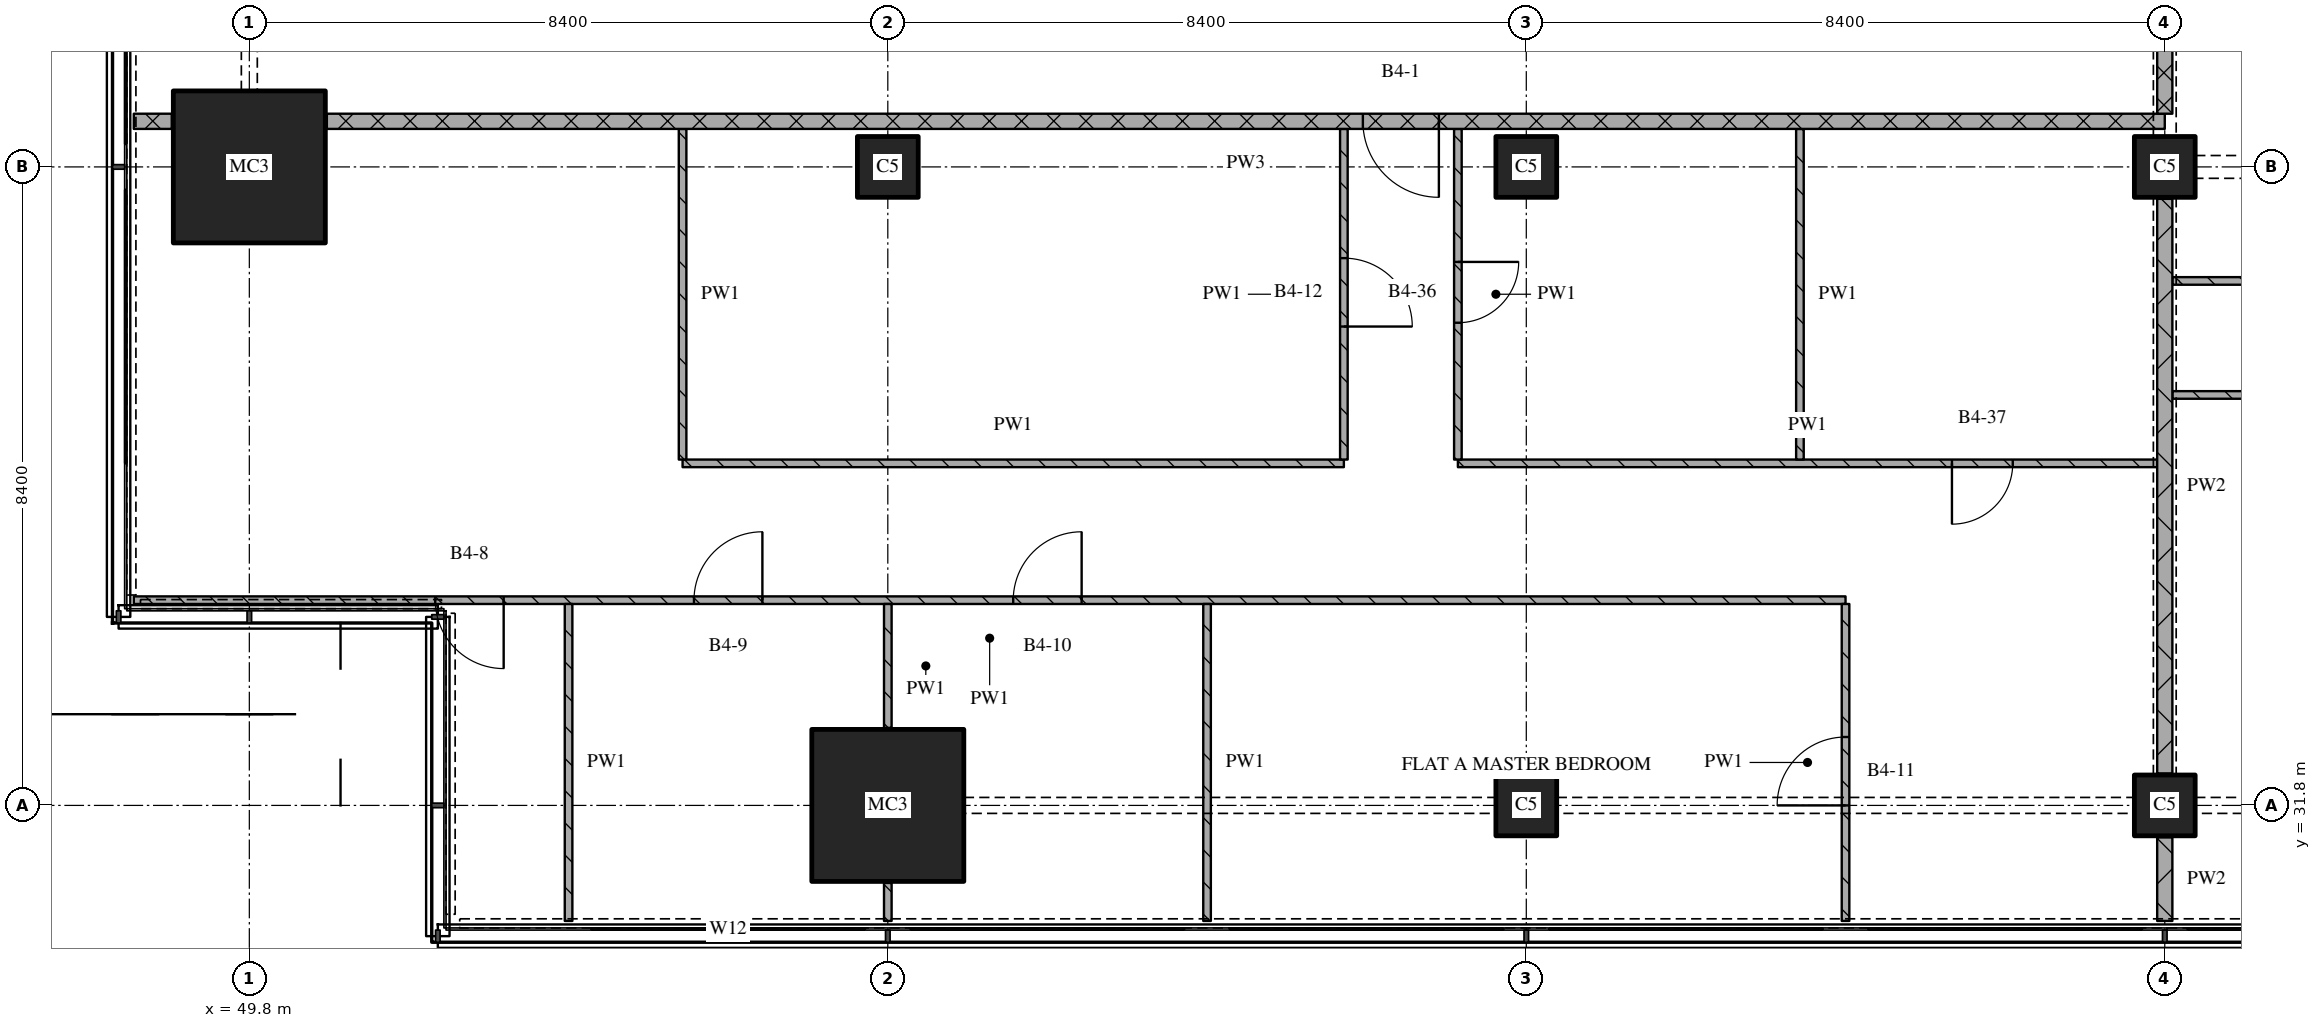
"""IFC4 building model, lengths in metres.
Left out: names, types, materials, properties, quantities, classifications, styles, units other than length and angle.
Written with IfcOpenShell. Run it as: python <this file> out.ifc"""

import sys

from ifc_helpers import new_model, si_unit, direction, frame, frame_2d, origin, origin_2d, place, context, subcontext, project, spatial, rectangle, extrude, element, fill, save


model = new_model("IFC4")
c1 = context("Model", 3, precision=1e-05, world=origin(), true_north=direction((0.0, 1.0)))
c2 = subcontext(c1, "Body", "Model", "MODEL_VIEW")
j1 = project(units=[si_unit("LENGTHUNIT", "METRE"), si_unit("PLANEANGLEUNIT", "RADIAN")], contexts=[c1])
p1 = place(None, origin())
s1 = spatial("IfcSite", under=j1, at=p1, CompositionType="ELEMENT")
p2 = place(p1, origin())
s2 = spatial("IfcBuilding", under=s1, at=p2, CompositionType="ELEMENT")
p3 = place(p2, frame((0.0, 0.0, 134.85)))
s3 = spatial("IfcBuildingStorey", under=s2, at=p3, CompositionType="ELEMENT", Elevation=134.85)
for number, where, z_axis, x_axis in (
    (1, (49.8, 40.2, 0.0), (0.0, 0.0, 1.0), (1.0, 0.0, 0.0)),
    (2, (58.2, 31.8, 0.0), (0.0, 0.0, 1.0), (1.0, 0.0, 0.0)),
):
    element("IfcColumn", number, at=place(p3, frame(where, z_axis=z_axis, x_axis=x_axis)), inside=s3, PredefinedType="COLUMN", context=c2, shape_type="SweptSolid", body=[
        extrude(rectangle(XDim=2.0, YDim=2.0, at=origin_2d()), origin(), (0.0, 0.0, 1.0), 3.6),
    ])
for number, where, z_axis, x_axis in (
    (3, (58.2, 40.2, 0.0), (0.0, 0.0, 1.0), (1.0, 0.0, 0.0)),
    (4, (66.6, 31.8, 0.0), (0.0, 0.0, 1.0), (1.0, 0.0, 0.0)),
    (5, (66.6, 40.2, 0.0), (0.0, 0.0, 1.0), (1.0, 0.0, 0.0)),
    (6, (75.0, 31.8, 0.0), (0.0, 0.0, 1.0), (1.0, 0.0, 0.0)),
    (7, (75.0, 40.2, 0.0), (0.0, 0.0, 1.0), (1.0, 0.0, 0.0)),
):
    element("IfcColumn", number, at=place(p3, frame(where, z_axis=z_axis, x_axis=x_axis)), inside=s3, PredefinedType="COLUMN", context=c2, shape_type="SweptSolid", body=[
        extrude(rectangle(XDim=0.8, YDim=0.8, at=origin_2d()), origin(), (0.0, 0.0, 1.0), 3.6),
    ])
p4 = place(p3, frame((70.8, 34.5, 0.0), z_axis=(0.0, 0.0, 1.0), x_axis=(-1.0, 0.0, 0.0)))
e8 = element("IfcWall", 8, at=p4, inside=s3, PredefinedType="PARTITIONING", context=c2, shape_type="SweptSolid", body=[
    extrude(rectangle(XDim=22.52, YDim=0.1, at=frame_2d((11.26, 0.0))), origin(), (0.0, 0.0, 1.0), 3.32),
])
p5 = place(p4, frame((10.05, 0.0, 0.0)))
e9 = element("IfcOpeningElement", 9, at=p5, cuts=e8, PredefinedType="OPENING", context=c2, shape_type="SweptSolid", body=[
    extrude(rectangle(XDim=0.9, YDim=2.1, at=frame_2d((0.45, 1.05))), frame((0.0, 0.06, 0.0), z_axis=(0.0, -1.0, 0.0), x_axis=(1.0, 0.0, 0.0)), (0.0, 0.0, 1.0), 0.12),
])
p6 = place(p4, frame((14.25, 0.0, 0.0)))
e10 = element("IfcOpeningElement", 10, at=p6, cuts=e8, PredefinedType="OPENING", context=c2, shape_type="SweptSolid", body=[
    extrude(rectangle(XDim=0.9, YDim=2.1, at=frame_2d((0.45, 1.05))), frame((0.0, 0.06, 0.0), z_axis=(0.0, -1.0, 0.0), x_axis=(1.0, 0.0, 0.0)), (0.0, 0.0, 1.0), 0.12),
])
p7 = place(p4, frame((17.654, 0.0, 0.0)))
e11 = element("IfcOpeningElement", 11, at=p7, cuts=e8, PredefinedType="OPENING", context=c2, shape_type="SweptSolid", body=[
    extrude(rectangle(XDim=0.9, YDim=2.1, at=frame_2d((0.45, 1.05))), frame((0.0, 0.06, 0.0), z_axis=(0.0, -1.0, 0.0), x_axis=(1.0, 0.0, 0.0)), (0.0, 0.0, 1.0), 0.12),
])
p8 = place(p3, frame((55.5, 36.3, 0.0), z_axis=(0.0, 0.0, 1.0), x_axis=(1.0, 0.0, 0.0)))
e12 = element("IfcWall", 12, at=p8, inside=s3, PredefinedType="PARTITIONING", context=c2, shape_type="SweptSolid", body=[
    extrude(rectangle(XDim=8.7, YDim=0.1, at=frame_2d((4.35, 0.0))), origin(), (0.0, 0.0, 1.0), 3.32),
])
p9 = place(p3, frame((65.7, 36.3, 0.0), z_axis=(0.0, 0.0, 1.0), x_axis=(1.0, 0.0, 0.0)))
e13 = element("IfcWall", 13, at=p9, inside=s3, PredefinedType="PARTITIONING", context=c2, shape_type="SweptSolid", body=[
    extrude(rectangle(XDim=9.2, YDim=0.1, at=frame_2d((4.6, 0.0))), origin(), (0.0, 0.0, 1.0), 3.32),
])
p10 = place(p9, frame((6.5, 0.0, 0.0)))
e14 = element("IfcOpeningElement", 14, at=p10, cuts=e13, PredefinedType="OPENING", context=c2, shape_type="SweptSolid", body=[
    extrude(rectangle(XDim=0.8, YDim=2.1, at=frame_2d((0.4, 1.05))), frame((0.0, 0.06, 0.0), z_axis=(0.0, -1.0, 0.0), x_axis=(1.0, 0.0, 0.0)), (0.0, 0.0, 1.0), 0.12),
])
p11 = place(p3, frame((96.0, 37.2, 0.0), z_axis=(0.0, 0.0, 1.0), x_axis=(-1.0, 0.0, 0.0)))
e15 = element("IfcWall", 15, at=p11, inside=s3, PredefinedType="PARTITIONING", context=c2, shape_type="SweptSolid", body=[
    extrude(rectangle(XDim=20.9, YDim=0.1, at=frame_2d((10.45, 0.0))), origin(), (0.0, 0.0, 1.0), 3.32),
])
p12 = place(p11, frame((10.05, 0.0, 0.0)))
e16 = element("IfcOpeningElement", 16, at=p12, cuts=e15, PredefinedType="OPENING", context=c2, shape_type="SweptSolid", body=[
    extrude(rectangle(XDim=0.9, YDim=2.1, at=frame_2d((0.45, 1.05))), frame((0.0, 0.06, 0.0), z_axis=(0.0, -1.0, 0.0), x_axis=(1.0, 0.0, 0.0)), (0.0, 0.0, 1.0), 0.12),
])
p13 = place(p11, frame((14.25, 0.0, 0.0)))
e17 = element("IfcOpeningElement", 17, at=p13, cuts=e15, PredefinedType="OPENING", context=c2, shape_type="SweptSolid", body=[
    extrude(rectangle(XDim=0.9, YDim=2.1, at=frame_2d((0.45, 1.05))), frame((0.0, 0.06, 0.0), z_axis=(0.0, -1.0, 0.0), x_axis=(1.0, 0.0, 0.0)), (0.0, 0.0, 1.0), 0.12),
])
p14 = place(p11, frame((18.45, 0.0, 0.0)))
e18 = element("IfcOpeningElement", 18, at=p14, cuts=e15, PredefinedType="OPENING", context=c2, shape_type="SweptSolid", body=[
    extrude(rectangle(XDim=0.9, YDim=2.1, at=frame_2d((0.45, 1.05))), frame((0.0, 0.06, 0.0), z_axis=(0.0, -1.0, 0.0), x_axis=(1.0, 0.0, 0.0)), (0.0, 0.0, 1.0), 0.12),
])
p15 = place(p3, frame((75.1, 38.7, 0.0), z_axis=(0.0, 0.0, 1.0), x_axis=(1.0, 0.0, 0.0)))
e19 = element("IfcWall", 19, at=p15, inside=s3, PredefinedType="PARTITIONING", context=c2, shape_type="SweptSolid", body=[
    extrude(rectangle(XDim=7.1, YDim=0.1, at=frame_2d((3.55, 0.0))), origin(), (0.0, 0.0, 1.0), 3.32),
])
p16 = place(p15, frame((1.75, 0.0, 0.0)))
e20 = element("IfcOpeningElement", 20, at=p16, cuts=e19, PredefinedType="OPENING", context=c2, shape_type="SweptSolid", body=[
    extrude(rectangle(XDim=0.8, YDim=2.1, at=frame_2d((0.4, 1.05))), frame((0.0, 0.06, 0.0), z_axis=(0.0, -1.0, 0.0), x_axis=(1.0, 0.0, 0.0)), (0.0, 0.0, 1.0), 0.12),
])
p17 = place(p3, frame((48.28, 40.8, 0.0), z_axis=(0.0, 0.0, 1.0), x_axis=(1.0, 0.0, 0.0)))
e21 = element("IfcWall", 21, at=p17, inside=s3, PredefinedType="PARTITIONING", context=c2, shape_type="SweptSolid", body=[
    extrude(rectangle(XDim=0.5, YDim=0.2, at=frame_2d((0.25, 0.0))), origin(), (0.0, 0.0, 1.0), 3.32),
])
p18 = place(p3, frame((75.0, 40.8, 0.0), z_axis=(0.0, 0.0, 1.0), x_axis=(-1.0, 0.0, 0.0)))
e22 = element("IfcWall", 22, at=p18, inside=s3, PredefinedType="PARTITIONING", context=c2, shape_type="SweptSolid", body=[
    extrude(rectangle(XDim=24.18, YDim=0.2, at=frame_2d((12.09, 0.0))), origin(), (0.0, 0.0, 1.0), 3.32),
])
p19 = place(p18, frame((9.55, 0.0, 0.0)))
e23 = element("IfcOpeningElement", 23, at=p19, cuts=e22, PredefinedType="OPENING", context=c2, shape_type="SweptSolid", body=[
    extrude(rectangle(XDim=1.0, YDim=2.1, at=frame_2d((0.5, 1.05))), frame((0.0, 0.11, 0.0), z_axis=(0.0, -1.0, 0.0), x_axis=(1.0, 0.0, 0.0)), (0.0, 0.0, 1.0), 0.22),
])
p20 = place(p3, frame((54.0, 34.45, 0.0), z_axis=(0.0, 0.0, 1.0), x_axis=(0.0, -1.0, 0.0)))
e24 = element("IfcWall", 24, at=p20, inside=s3, PredefinedType="PARTITIONING", context=c2, shape_type="SweptSolid", body=[
    extrude(rectangle(XDim=4.17, YDim=0.1, at=frame_2d((2.085, 0.0))), origin(), (0.0, 0.0, 1.0), 3.32),
])
p21 = place(p3, frame((55.5, 40.7, 0.0), z_axis=(0.0, 0.0, 1.0), x_axis=(0.0, -1.0, 0.0)))
e25 = element("IfcWall", 25, at=p21, inside=s3, PredefinedType="PARTITIONING", context=c2, shape_type="SweptSolid", body=[
    extrude(rectangle(XDim=4.35, YDim=0.1, at=frame_2d((2.175, 0.0))), origin(), (0.0, 0.0, 1.0), 3.32),
])
p22 = place(p3, frame((58.2, 30.78, 0.0), z_axis=(0.0, 0.0, 1.0), x_axis=(0.0, -1.0, 0.0)))
e26 = element("IfcWall", 26, at=p22, inside=s3, PredefinedType="PARTITIONING", context=c2, shape_type="SweptSolid", body=[
    extrude(rectangle(XDim=0.5, YDim=0.1, at=frame_2d((0.25, 0.0))), origin(), (0.0, 0.0, 1.0), 3.32),
])
p23 = place(p3, frame((58.2, 34.45, 0.0), z_axis=(0.0, 0.0, 1.0), x_axis=(0.0, -1.0, 0.0)))
e27 = element("IfcWall", 27, at=p23, inside=s3, PredefinedType="PARTITIONING", context=c2, shape_type="SweptSolid", body=[
    extrude(rectangle(XDim=1.63, YDim=0.1, at=frame_2d((0.815, 0.0))), origin(), (0.0, 0.0, 1.0), 3.32),
])
p24 = place(p3, frame((62.4, 34.45, 0.0), z_axis=(0.0, 0.0, 1.0), x_axis=(0.0, -1.0, 0.0)))
e28 = element("IfcWall", 28, at=p24, inside=s3, PredefinedType="PARTITIONING", context=c2, shape_type="SweptSolid", body=[
    extrude(rectangle(XDim=4.17, YDim=0.1, at=frame_2d((2.085, 0.0))), origin(), (0.0, 0.0, 1.0), 3.32),
])
p25 = place(p3, frame((64.2, 36.35, 0.0), z_axis=(0.0, 0.0, 1.0), x_axis=(0.0, 1.0, 0.0)))
e29 = element("IfcWall", 29, at=p25, inside=s3, PredefinedType="PARTITIONING", context=c2, shape_type="SweptSolid", body=[
    extrude(rectangle(XDim=4.35, YDim=0.1, at=frame_2d((2.175, 0.0))), origin(), (0.0, 0.0, 1.0), 3.32),
])
p26 = place(p25, frame((1.75, 0.0, 0.0)))
e30 = element("IfcOpeningElement", 30, at=p26, cuts=e29, PredefinedType="OPENING", context=c2, shape_type="SweptSolid", body=[
    extrude(rectangle(XDim=0.9, YDim=2.1, at=frame_2d((0.45, 1.05))), frame((0.0, 0.06, 0.0), z_axis=(0.0, -1.0, 0.0), x_axis=(1.0, 0.0, 0.0)), (0.0, 0.0, 1.0), 0.12),
])
p27 = place(p3, frame((65.7, 40.7, 0.0), z_axis=(0.0, 0.0, 1.0), x_axis=(0.0, -1.0, 0.0)))
e31 = element("IfcWall", 31, at=p27, inside=s3, PredefinedType="PARTITIONING", context=c2, shape_type="SweptSolid", body=[
    extrude(rectangle(XDim=4.35, YDim=0.1, at=frame_2d((2.175, 0.0))), origin(), (0.0, 0.0, 1.0), 3.32),
])
p28 = place(p27, frame((1.75, 0.0, 0.0)))
e32 = element("IfcOpeningElement", 32, at=p28, cuts=e31, PredefinedType="OPENING", context=c2, shape_type="SweptSolid", body=[
    extrude(rectangle(XDim=0.8, YDim=2.1, at=frame_2d((0.4, 1.05))), frame((0.0, 0.06, 0.0), z_axis=(0.0, -1.0, 0.0), x_axis=(1.0, 0.0, 0.0)), (0.0, 0.0, 1.0), 0.12),
])
p29 = place(p3, frame((70.2, 40.7, 0.0), z_axis=(0.0, 0.0, 1.0), x_axis=(0.0, -1.0, 0.0)))
e33 = element("IfcWall", 33, at=p29, inside=s3, PredefinedType="PARTITIONING", context=c2, shape_type="SweptSolid", body=[
    extrude(rectangle(XDim=4.35, YDim=0.1, at=frame_2d((2.175, 0.0))), origin(), (0.0, 0.0, 1.0), 3.32),
])
p30 = place(p3, frame((70.8, 30.28, 0.0), z_axis=(0.0, 0.0, 1.0), x_axis=(0.0, 1.0, 0.0)))
e34 = element("IfcWall", 34, at=p30, inside=s3, PredefinedType="PARTITIONING", context=c2, shape_type="SweptSolid", body=[
    extrude(rectangle(XDim=4.17, YDim=0.1, at=frame_2d((2.085, 0.0))), origin(), (0.0, 0.0, 1.0), 3.32),
])
p31 = place(p30, frame((1.52, 0.0, 0.0)))
e35 = element("IfcOpeningElement", 35, at=p31, cuts=e34, PredefinedType="OPENING", context=c2, shape_type="SweptSolid", body=[
    extrude(rectangle(XDim=0.9, YDim=2.1, at=frame_2d((0.45, 1.05))), frame((0.0, 0.06, 0.0), z_axis=(0.0, -1.0, 0.0), x_axis=(1.0, 0.0, 0.0)), (0.0, 0.0, 1.0), 0.12),
])
p32 = place(p3, frame((75.0, 43.1, 0.0), z_axis=(0.0, 0.0, 1.0), x_axis=(0.0, -1.0, 0.0)))
e36 = element("IfcWall", 36, at=p32, inside=s3, PredefinedType="PARTITIONING", context=c2, shape_type="SweptSolid", body=[
    extrude(rectangle(XDim=2.2, YDim=0.2, at=frame_2d((1.1, 0.0))), origin(), (0.0, 0.0, 1.0), 2.43),
])
p33 = place(p3, frame((75.0, 31.38, 0.0), z_axis=(0.0, 0.0, 1.0), x_axis=(0.0, -1.0, 0.0)))
e37 = element("IfcWall", 37, at=p33, inside=s3, PredefinedType="PARTITIONING", context=c2, shape_type="SweptSolid", body=[
    extrude(rectangle(XDim=1.1, YDim=0.2, at=frame_2d((0.55, 0.0))), origin(), (0.0, 0.0, 1.0), 3.32),
])
p34 = place(p3, frame((75.0, 39.78, 0.0), z_axis=(0.0, 0.0, 1.0), x_axis=(0.0, -1.0, 0.0)))
e38 = element("IfcWall", 38, at=p34, inside=s3, PredefinedType="PARTITIONING", context=c2, shape_type="SweptSolid", body=[
    extrude(rectangle(XDim=7.56, YDim=0.2, at=frame_2d((3.78, 0.0))), origin(), (0.0, 0.0, 1.0), 2.83),
])
p35 = place(p5, origin())
e39 = element("IfcDoor", 39, at=p35, inside=s3, OperationType="SINGLE_SWING_RIGHT", PredefinedType="DOOR", context=c2, shape_type="SweptSolid", body=[
    extrude(rectangle(XDim=0.9, YDim=2.1, at=frame_2d((0.45, 1.05))), frame((0.0, 0.025, 0.0), z_axis=(0.0, -1.0, 0.0), x_axis=(1.0, 0.0, 0.0)), (0.0, 0.0, 1.0), 0.05),
])
fill(e9, e39)
p36 = place(p6, origin())
e40 = element("IfcDoor", 40, at=p36, inside=s3, OperationType="SINGLE_SWING_RIGHT", PredefinedType="DOOR", context=c2, shape_type="SweptSolid", body=[
    extrude(rectangle(XDim=0.9, YDim=2.1, at=frame_2d((0.45, 1.05))), frame((0.0, 0.025, 0.0), z_axis=(0.0, -1.0, 0.0), x_axis=(1.0, 0.0, 0.0)), (0.0, 0.0, 1.0), 0.05),
])
fill(e10, e40)
p37 = place(p7, origin())
e41 = element("IfcDoor", 41, at=p37, inside=s3, OperationType="SINGLE_SWING_LEFT", PredefinedType="DOOR", context=c2, shape_type="SweptSolid", body=[
    extrude(rectangle(XDim=0.9, YDim=2.1, at=frame_2d((0.45, 1.05))), frame((0.0, 0.025, 0.0), z_axis=(0.0, -1.0, 0.0), x_axis=(1.0, 0.0, 0.0)), (0.0, 0.0, 1.0), 0.05),
])
fill(e11, e41)
p38 = place(p10, origin())
e42 = element("IfcDoor", 42, at=p38, inside=s3, OperationType="SINGLE_SWING_RIGHT", PredefinedType="DOOR", context=c2, shape_type="SweptSolid", body=[
    extrude(rectangle(XDim=0.8, YDim=2.1, at=frame_2d((0.4, 1.05))), frame((0.0, 0.025, 0.0), z_axis=(0.0, -1.0, 0.0), x_axis=(1.0, 0.0, 0.0)), (0.0, 0.0, 1.0), 0.05),
])
fill(e14, e42)
p39 = place(p19, origin())
e43 = element("IfcDoor", 43, at=p39, inside=s3, OperationType="SINGLE_SWING_LEFT", PredefinedType="DOOR", context=c2, shape_type="SweptSolid", body=[
    extrude(rectangle(XDim=1.0, YDim=2.1, at=frame_2d((0.5, 1.05))), frame((0.0, 0.025, 0.0), z_axis=(0.0, -1.0, 0.0), x_axis=(1.0, 0.0, 0.0)), (0.0, 0.0, 1.0), 0.05),
])
fill(e23, e43)
p40 = place(p26, origin())
e44 = element("IfcDoor", 44, at=p40, inside=s3, OperationType="SINGLE_SWING_RIGHT", PredefinedType="DOOR", context=c2, shape_type="SweptSolid", body=[
    extrude(rectangle(XDim=0.9, YDim=2.1, at=frame_2d((0.45, 1.05))), frame((0.0, 0.025, 0.0), z_axis=(0.0, -1.0, 0.0), x_axis=(1.0, 0.0, 0.0)), (0.0, 0.0, 1.0), 0.05),
])
fill(e30, e44)
p41 = place(p28, origin())
e45 = element("IfcDoor", 45, at=p41, inside=s3, OperationType="SINGLE_SWING_LEFT", PredefinedType="DOOR", context=c2, shape_type="SweptSolid", body=[
    extrude(rectangle(XDim=0.8, YDim=2.1, at=frame_2d((0.4, 1.05))), frame((0.0, 0.025, 0.0), z_axis=(0.0, -1.0, 0.0), x_axis=(1.0, 0.0, 0.0)), (0.0, 0.0, 1.0), 0.05),
])
fill(e32, e45)
p42 = place(p31, origin())
e46 = element("IfcDoor", 46, at=p42, inside=s3, OperationType="SINGLE_SWING_LEFT", PredefinedType="DOOR", context=c2, shape_type="SweptSolid", body=[
    extrude(rectangle(XDim=0.9, YDim=2.1, at=frame_2d((0.45, 1.05))), frame((0.0, 0.025, 0.0), z_axis=(0.0, -1.0, 0.0), x_axis=(1.0, 0.0, 0.0)), (0.0, 0.0, 1.0), 0.05),
])
fill(e35, e46)
save(model, sys.argv[1])
